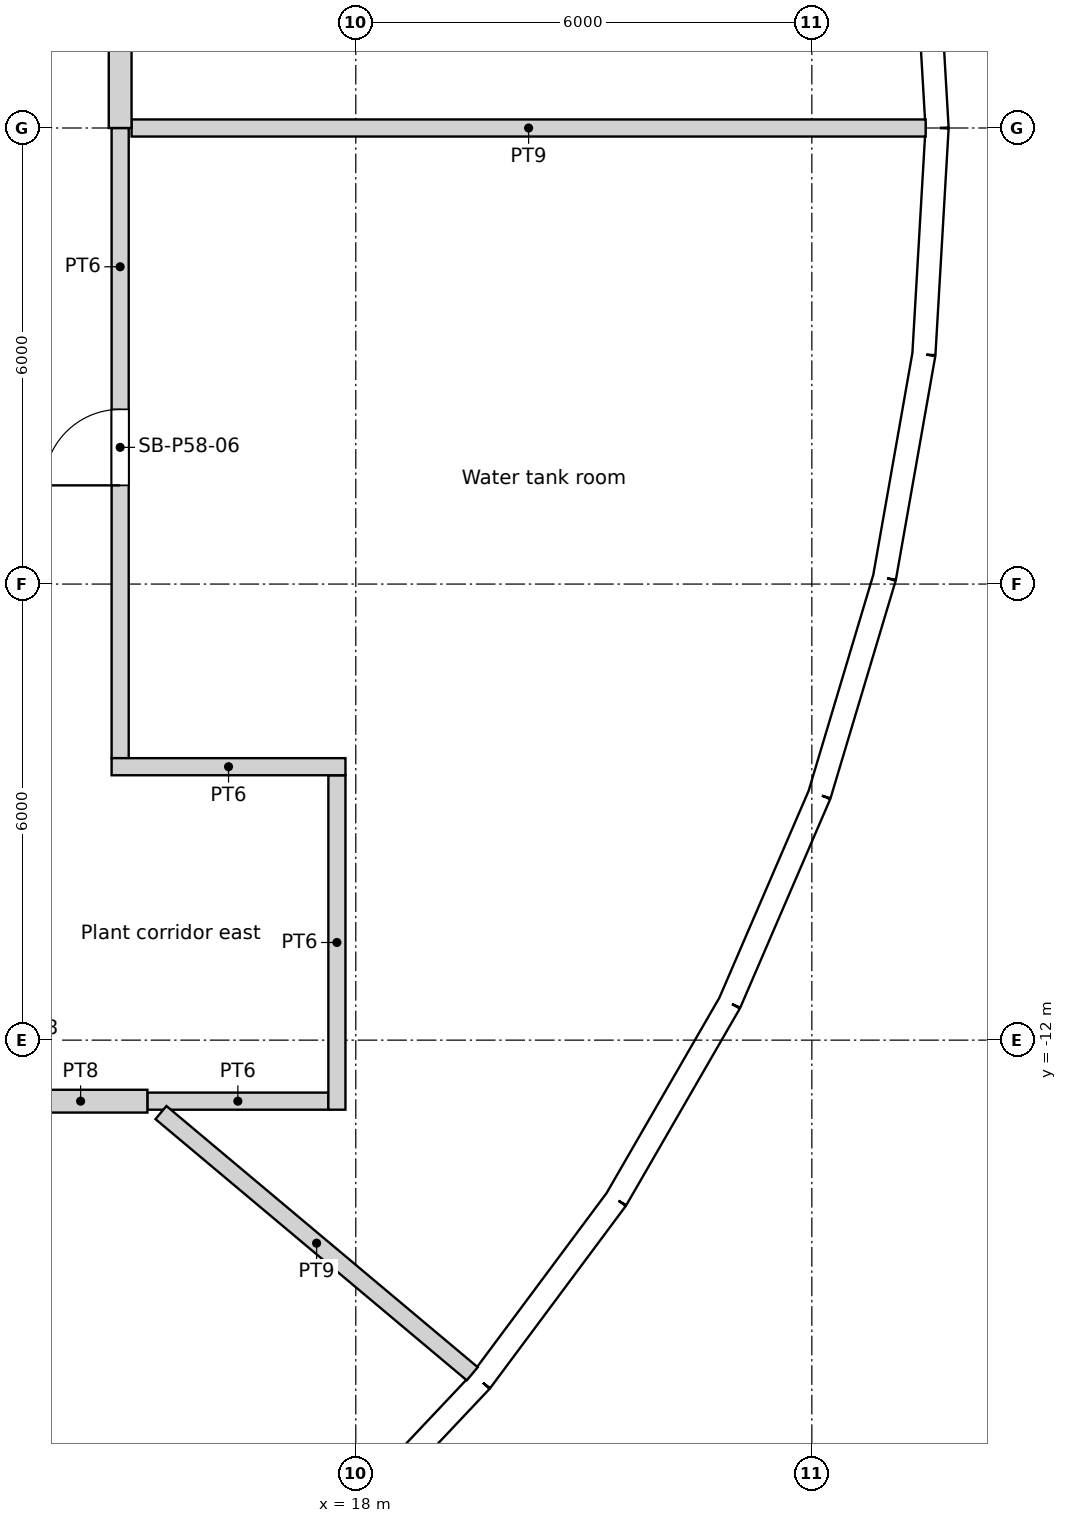
"""IFC4 building model, lengths in metres.
Left out: names, types, materials, properties, quantities, classifications, styles, units other than length and angle.
Written with IfcOpenShell. Run it as: python <this file> out.ifc"""

import sys

from ifc_helpers import new_model, si_unit, direction, frame, frame_2d, origin, origin_2d, place, context, subcontext, project, spatial, rectangle, circle, extrude, element, fill, save


model = new_model("IFC4")
c1 = context("Model", 3, precision=1e-05, world=origin(), true_north=direction((0.0, 1.0)))
c2 = subcontext(c1, "Body", "Model", "MODEL_VIEW")
j1 = project(units=[si_unit("LENGTHUNIT", "METRE"), si_unit("PLANEANGLEUNIT", "RADIAN")], contexts=[c1])
p1 = place(None, origin())
s1 = spatial("IfcSite", under=j1, at=p1, CompositionType="ELEMENT")
p2 = place(p1, origin())
s2 = spatial("IfcBuilding", under=s1, at=p2, CompositionType="ELEMENT")
p3 = place(p2, frame((0.0, 0.0, 225.0)))
s3 = spatial("IfcBuildingStorey", under=s2, at=p3, CompositionType="ELEMENT", Elevation=225.0)
for number, where, z_axis, x_axis in (
    (1, (24.548, 0.0, 0.0), (0.0, 0.0, 1.0), (1.0, 0.0, 0.0)),
    (2, (18.805, -15.779, 0.0), (0.0, 0.0, 1.0), (1.0, 0.0, 0.0)),
    (3, (21.937, -11.017, 0.0), (0.0, 0.0, 1.0), (1.0, 0.0, 0.0)),
    (4, (23.886, -5.661, 0.0), (0.0, 0.0, 1.0), (1.0, 0.0, 0.0)),
):
    element("IfcColumn", number, at=place(p3, frame(where, z_axis=z_axis, x_axis=x_axis)), inside=s3, PredefinedType="COLUMN", context=c2, shape_type="SweptSolid", body=[
        extrude(circle(Radius=0.6, at=origin_2d()), origin(), (0.0, 0.0, 1.0), 6.0),
    ])
for number, where, z_axis, x_axis in (
    (5, (18.822, 0.0, 0.0), (0.0, 0.0, 1.0), (1.0, 0.0, 0.0)),
    (6, (15.552, -10.603, 0.0), (0.0, 0.0, 1.0), (1.0, 0.0, 0.0)),
    (7, (17.986, -5.548, 0.0), (0.0, 0.0, 1.0), (1.0, 0.0, 0.0)),
):
    element("IfcColumn", number, at=place(p3, frame(where, z_axis=z_axis, x_axis=x_axis)), inside=s3, PredefinedType="COLUMN", context=c2, shape_type="SweptSolid", body=[
        extrude(circle(Radius=0.65, at=origin_2d()), origin(), (0.0, 0.0, 1.0), 6.0),
    ])
p4 = place(p3, frame((25.647, 0.0, 0.0), z_axis=(0.0, 0.0, 1.0), x_axis=(-0.058117409476, 0.998309754894, 0.0)))
e8 = element("IfcWall", 8, at=p4, inside=s3, PredefinedType="SOLIDWALL", context=c2, shape_type="SweptSolid", body=[
    extrude(rectangle(XDim=2.983, YDim=0.3, at=frame_2d((1.491, 0.0))), origin(), (0.0, 0.0, 1.0), 5.65),
])
p5 = place(p4, frame((1.491, 0.0, 1.825)))
e9 = element("IfcOpeningElement", 9, at=p5, cuts=e8, PredefinedType="OPENING", context=c2, shape_type="SweptSolid", body=[
    extrude(circle(Radius=1.2, at=origin_2d()), frame((0.0, 0.16, 0.0), z_axis=(0.0, -1.0, 0.0), x_axis=(1.0, 0.0, 0.0)), (0.0, 0.0, 1.0), 0.32),
])
p6 = place(p3, frame((17.6, -18.655, 0.0), z_axis=(0.0, 0.0, 1.0), x_axis=(0.686219609698, 0.72739442345, 0.0)))
e10 = element("IfcWall", 10, at=p6, inside=s3, PredefinedType="SOLIDWALL", context=c2, shape_type="SweptSolid", body=[
    extrude(rectangle(XDim=2.982, YDim=0.3, at=frame_2d((1.491, 0.0))), origin(), (0.0, 0.0, 1.0), 5.65),
])
p7 = place(p6, frame((1.491, 0.0, 1.825)))
e11 = element("IfcOpeningElement", 11, at=p7, cuts=e10, PredefinedType="OPENING", context=c2, shape_type="SweptSolid", body=[
    extrude(circle(Radius=1.2, at=origin_2d()), frame((0.0, 0.16, 0.0), z_axis=(0.0, -1.0, 0.0), x_axis=(1.0, 0.0, 0.0)), (0.0, 0.0, 1.0), 0.32),
])
p8 = place(p3, frame((19.647, -16.486, 0.0), z_axis=(0.0, 0.0, 1.0), x_axis=(0.597206768034, 0.802087324557, 0.0)))
e12 = element("IfcWall", 12, at=p8, inside=s3, PredefinedType="SOLIDWALL", context=c2, shape_type="SweptSolid", body=[
    extrude(rectangle(XDim=2.983, YDim=0.3, at=frame_2d((1.491, 0.0))), origin(), (0.0, 0.0, 1.0), 5.65),
])
p9 = place(p8, frame((1.491, 0.0, 1.825)))
e13 = element("IfcOpeningElement", 13, at=p9, cuts=e12, PredefinedType="OPENING", context=c2, shape_type="SweptSolid", body=[
    extrude(circle(Radius=1.2, at=origin_2d()), frame((0.0, 0.16, 0.0), z_axis=(0.0, -1.0, 0.0), x_axis=(1.0, 0.0, 0.0)), (0.0, 0.0, 1.0), 0.32),
])
p10 = place(p3, frame((21.428, -14.094, 0.0), z_axis=(0.0, 0.0, 1.0), x_axis=(0.499977539641, 0.866038370891, 0.0)))
e14 = element("IfcWall", 14, at=p10, inside=s3, PredefinedType="SOLIDWALL", context=c2, shape_type="SweptSolid", body=[
    extrude(rectangle(XDim=2.983, YDim=0.3, at=frame_2d((1.491, 0.0))), origin(), (0.0, 0.0, 1.0), 5.65),
])
p11 = place(p10, frame((1.491, 0.0, 1.825)))
e15 = element("IfcOpeningElement", 15, at=p11, cuts=e14, PredefinedType="OPENING", context=c2, shape_type="SweptSolid", body=[
    extrude(circle(Radius=1.2, at=origin_2d()), frame((0.0, 0.16, 0.0), z_axis=(0.0, -1.0, 0.0), x_axis=(1.0, 0.0, 0.0)), (0.0, 0.0, 1.0), 0.32),
])
p12 = place(p3, frame((22.919, -11.51, 0.0), z_axis=(0.0, 0.0, 1.0), x_axis=(0.396111410027, 0.918202456349, 0.0)))
e16 = element("IfcWall", 16, at=p12, inside=s3, PredefinedType="SOLIDWALL", context=c2, shape_type="SweptSolid", body=[
    extrude(rectangle(XDim=2.982, YDim=0.3, at=frame_2d((1.491, 0.0))), origin(), (0.0, 0.0, 1.0), 5.65),
])
p13 = place(p12, frame((1.491, 0.0, 1.825)))
e17 = element("IfcOpeningElement", 17, at=p13, cuts=e16, PredefinedType="OPENING", context=c2, shape_type="SweptSolid", body=[
    extrude(circle(Radius=1.2, at=origin_2d()), frame((0.0, 0.16, 0.0), z_axis=(0.0, -1.0, 0.0), x_axis=(1.0, 0.0, 0.0)), (0.0, 0.0, 1.0), 0.32),
])
p14 = place(p3, frame((24.101, -8.772, 0.0), z_axis=(0.0, 0.0, 1.0), x_axis=(0.286754535355, 0.958004089998, 0.0)))
e18 = element("IfcWall", 18, at=p14, inside=s3, PredefinedType="SOLIDWALL", context=c2, shape_type="SweptSolid", body=[
    extrude(rectangle(XDim=2.982, YDim=0.3, at=frame_2d((1.491, 0.0))), origin(), (0.0, 0.0, 1.0), 5.65),
])
p15 = place(p14, frame((1.491, 0.0, 1.825)))
e19 = element("IfcOpeningElement", 19, at=p15, cuts=e18, PredefinedType="OPENING", context=c2, shape_type="SweptSolid", body=[
    extrude(circle(Radius=1.2, at=origin_2d()), frame((0.0, 0.16, 0.0), z_axis=(0.0, -1.0, 0.0), x_axis=(1.0, 0.0, 0.0)), (0.0, 0.0, 1.0), 0.32),
])
p16 = place(p3, frame((24.956, -5.915, 0.0), z_axis=(0.0, 0.0, 1.0), x_axis=(0.17369661102, 0.984799211677, 0.0)))
e20 = element("IfcWall", 20, at=p16, inside=s3, PredefinedType="SOLIDWALL", context=c2, shape_type="SweptSolid", body=[
    extrude(rectangle(XDim=2.983, YDim=0.3, at=frame_2d((1.491, 0.0))), origin(), (0.0, 0.0, 1.0), 5.65),
])
p17 = place(p16, frame((1.491, 0.0, 1.825)))
e21 = element("IfcOpeningElement", 21, at=p17, cuts=e20, PredefinedType="OPENING", context=c2, shape_type="SweptSolid", body=[
    extrude(circle(Radius=1.2, at=origin_2d()), frame((0.0, 0.16, 0.0), z_axis=(0.0, -1.0, 0.0), x_axis=(1.0, 0.0, 0.0)), (0.0, 0.0, 1.0), 0.32),
])
p18 = place(p3, frame((25.474, -2.978, 0.0), z_axis=(0.0, 0.0, 1.0), x_axis=(0.058117409476, 0.998309754894, 0.0)))
e22 = element("IfcWall", 22, at=p18, inside=s3, PredefinedType="SOLIDWALL", context=c2, shape_type="SweptSolid", body=[
    extrude(rectangle(XDim=2.983, YDim=0.3, at=frame_2d((1.491, 0.0))), origin(), (0.0, 0.0, 1.0), 5.65),
])
p19 = place(p18, frame((1.491, 0.0, 1.825)))
e23 = element("IfcOpeningElement", 23, at=p19, cuts=e22, PredefinedType="OPENING", context=c2, shape_type="SweptSolid", body=[
    extrude(circle(Radius=1.2, at=origin_2d()), frame((0.0, 0.16, 0.0), z_axis=(0.0, -1.0, 0.0), x_axis=(1.0, 0.0, 0.0)), (0.0, 0.0, 1.0), 0.32),
])
p20 = place(p3, frame((13.502, -12.803, 0.0), z_axis=(0.0, 0.0, 1.0), x_axis=(1.0, 0.0, 0.0)))
e24 = element("IfcWall", 24, at=p20, inside=s3, PredefinedType="PARTITIONING", context=c2, shape_type="SweptSolid", body=[
    extrude(rectangle(XDim=1.756, YDim=0.3, at=frame_2d((0.878, 0.0))), origin(), (0.0, 0.0, 1.0), 5.2),
])
p21 = place(p3, frame((14.9, -8.29, 0.0), z_axis=(0.0, 0.0, 1.0), x_axis=(0.0, 1.0, 0.0)))
e25 = element("IfcWall", 25, at=p21, inside=s3, PredefinedType="PARTITIONING", context=c2, shape_type="SweptSolid", body=[
    extrude(rectangle(XDim=8.29, YDim=0.225, at=frame_2d((4.145, 0.0))), origin(), (0.0, 0.0, 1.0), 5.2),
])
p22 = place(p21, frame((3.589, 0.0, 0.0)))
e26 = element("IfcOpeningElement", 26, at=p22, cuts=e25, PredefinedType="OPENING", context=c2, shape_type="SweptSolid", body=[
    extrude(rectangle(XDim=1.0, YDim=2.1, at=frame_2d((0.5, 1.05))), frame((0.0, 0.113, 0.0), z_axis=(0.0, -1.0, 0.0), x_axis=(1.0, 0.0, 0.0)), (0.0, 0.0, 1.0), 0.225),
])
p23 = place(p3, frame((14.9, 0.0, 0.0), z_axis=(0.0, 0.0, 1.0), x_axis=(0.0, 1.0, 0.0)))
e27 = element("IfcWall", 27, at=p23, inside=s3, PredefinedType="PARTITIONING", context=c2, shape_type="SweptSolid", body=[
    extrude(rectangle(XDim=8.253, YDim=0.3, at=frame_2d((4.126, 0.0))), origin(), (0.0, 0.0, 1.0), 5.2),
])
p24 = place(p23, frame((3.302, 0.0, 0.0)))
e28 = element("IfcOpeningElement", 28, at=p24, cuts=e27, PredefinedType="OPENING", context=c2, shape_type="SweptSolid", body=[
    extrude(rectangle(XDim=1.8, YDim=2.4, at=frame_2d((0.9, 1.2))), frame((0.0, 0.15, 0.0), z_axis=(0.0, -1.0, 0.0), x_axis=(1.0, 0.0, 0.0)), (0.0, 0.0, 1.0), 0.3),
])
p25 = place(p3, frame((15.258, -12.803, 0.0), z_axis=(0.0, 0.0, 1.0), x_axis=(1.0, 0.0, 0.0)))
e29 = element("IfcWall", 29, at=p25, inside=s3, PredefinedType="PARTITIONING", context=c2, shape_type="SweptSolid", body=[
    extrude(rectangle(XDim=2.381, YDim=0.225, at=frame_2d((1.191, 0.0))), origin(), (0.0, 0.0, 1.0), 5.2),
])
p26 = place(p3, frame((17.752, -12.915, 0.0), z_axis=(0.0, 0.0, 1.0), x_axis=(0.0, 1.0, 0.0)))
e30 = element("IfcWall", 30, at=p26, inside=s3, PredefinedType="PARTITIONING", context=c2, shape_type="SweptSolid", body=[
    extrude(rectangle(XDim=4.4, YDim=0.225, at=frame_2d((2.2, 0.0))), origin(), (0.0, 0.0, 1.0), 5.2),
])
p27 = place(p3, frame((17.864, -8.403, 0.0), z_axis=(0.0, 0.0, 1.0), x_axis=(-1.0, 0.0, 0.0)))
e31 = element("IfcWall", 31, at=p27, inside=s3, PredefinedType="PARTITIONING", context=c2, shape_type="SweptSolid", body=[
    extrude(rectangle(XDim=3.076, YDim=0.225, at=frame_2d((1.538, 0.0))), origin(), (0.0, 0.0, 1.0), 5.2),
])
p28 = place(p3, frame((19.532, -16.389, 0.0), z_axis=(0.0, 0.0, 1.0), x_axis=(-0.766023242491, 0.642812874765, 0.0)))
e32 = element("IfcWall", 32, at=p28, inside=s3, PredefinedType="PARTITIONING", context=c2, shape_type="SweptSolid", body=[
    extrude(rectangle(XDim=5.346, YDim=0.225, at=frame_2d((2.673, 0.0))), origin(), (0.0, 0.0, 1.0), 2.7),
])
p29 = place(p3, frame((25.497, 0.0, 0.0), z_axis=(0.0, 0.0, 1.0), x_axis=(-1.0, 0.0, 0.0)))
e33 = element("IfcWall", 33, at=p29, inside=s3, PredefinedType="PARTITIONING", context=c2, shape_type="SweptSolid", body=[
    extrude(rectangle(XDim=10.447, YDim=0.225, at=frame_2d((5.224, 0.0))), origin(), (0.0, 0.0, 1.0), 2.7),
])
p30 = place(p5, origin())
e34 = element("IfcWindow", 34, at=p30, inside=s3, PartitioningType="SINGLE_PANEL", PredefinedType="WINDOW", context=c2, shape_type="SweptSolid", body=[
    extrude(circle(Radius=1.2, at=origin_2d()), frame((0.0, 0.12, 0.0), z_axis=(0.0, -1.0, 0.0), x_axis=(1.0, 0.0, 0.0)), (0.0, 0.0, 1.0), 0.1),
])
fill(e9, e34)
p31 = place(p7, origin())
e35 = element("IfcWindow", 35, at=p31, inside=s3, PartitioningType="SINGLE_PANEL", PredefinedType="WINDOW", context=c2, shape_type="SweptSolid", body=[
    extrude(circle(Radius=1.2, at=origin_2d()), frame((0.0, 0.12, 0.0), z_axis=(0.0, -1.0, 0.0), x_axis=(1.0, 0.0, 0.0)), (0.0, 0.0, 1.0), 0.1),
])
fill(e11, e35)
p32 = place(p9, origin())
e36 = element("IfcWindow", 36, at=p32, inside=s3, PartitioningType="SINGLE_PANEL", PredefinedType="WINDOW", context=c2, shape_type="SweptSolid", body=[
    extrude(circle(Radius=1.2, at=origin_2d()), frame((0.0, 0.12, 0.0), z_axis=(0.0, -1.0, 0.0), x_axis=(1.0, 0.0, 0.0)), (0.0, 0.0, 1.0), 0.1),
])
fill(e13, e36)
p33 = place(p11, origin())
e37 = element("IfcWindow", 37, at=p33, inside=s3, PartitioningType="SINGLE_PANEL", PredefinedType="WINDOW", context=c2, shape_type="SweptSolid", body=[
    extrude(circle(Radius=1.2, at=origin_2d()), frame((0.0, 0.12, 0.0), z_axis=(0.0, -1.0, 0.0), x_axis=(1.0, 0.0, 0.0)), (0.0, 0.0, 1.0), 0.1),
])
fill(e15, e37)
p34 = place(p13, origin())
e38 = element("IfcWindow", 38, at=p34, inside=s3, PartitioningType="SINGLE_PANEL", PredefinedType="WINDOW", context=c2, shape_type="SweptSolid", body=[
    extrude(circle(Radius=1.2, at=origin_2d()), frame((0.0, 0.12, 0.0), z_axis=(0.0, -1.0, 0.0), x_axis=(1.0, 0.0, 0.0)), (0.0, 0.0, 1.0), 0.1),
])
fill(e17, e38)
p35 = place(p15, origin())
e39 = element("IfcWindow", 39, at=p35, inside=s3, PartitioningType="SINGLE_PANEL", PredefinedType="WINDOW", context=c2, shape_type="SweptSolid", body=[
    extrude(circle(Radius=1.2, at=origin_2d()), frame((0.0, 0.12, 0.0), z_axis=(0.0, -1.0, 0.0), x_axis=(1.0, 0.0, 0.0)), (0.0, 0.0, 1.0), 0.1),
])
fill(e19, e39)
p36 = place(p17, origin())
e40 = element("IfcWindow", 40, at=p36, inside=s3, PartitioningType="SINGLE_PANEL", PredefinedType="WINDOW", context=c2, shape_type="SweptSolid", body=[
    extrude(circle(Radius=1.2, at=origin_2d()), frame((0.0, 0.12, 0.0), z_axis=(0.0, -1.0, 0.0), x_axis=(1.0, 0.0, 0.0)), (0.0, 0.0, 1.0), 0.1),
])
fill(e21, e40)
p37 = place(p19, origin())
e41 = element("IfcWindow", 41, at=p37, inside=s3, PartitioningType="SINGLE_PANEL", PredefinedType="WINDOW", context=c2, shape_type="SweptSolid", body=[
    extrude(circle(Radius=1.2, at=origin_2d()), frame((0.0, 0.12, 0.0), z_axis=(0.0, -1.0, 0.0), x_axis=(1.0, 0.0, 0.0)), (0.0, 0.0, 1.0), 0.1),
])
fill(e23, e41)
p38 = place(p22, origin())
e42 = element("IfcDoor", 42, at=p38, inside=s3, OperationType="SINGLE_SWING_LEFT", PredefinedType="DOOR", context=c2, shape_type="SweptSolid", body=[
    extrude(rectangle(XDim=1.0, YDim=2.1, at=frame_2d((0.5, 1.05))), frame((0.0, 0.025, 0.0), z_axis=(0.0, -1.0, 0.0), x_axis=(1.0, 0.0, 0.0)), (0.0, 0.0, 1.0), 0.05),
])
fill(e26, e42)
save(model, sys.argv[1])
